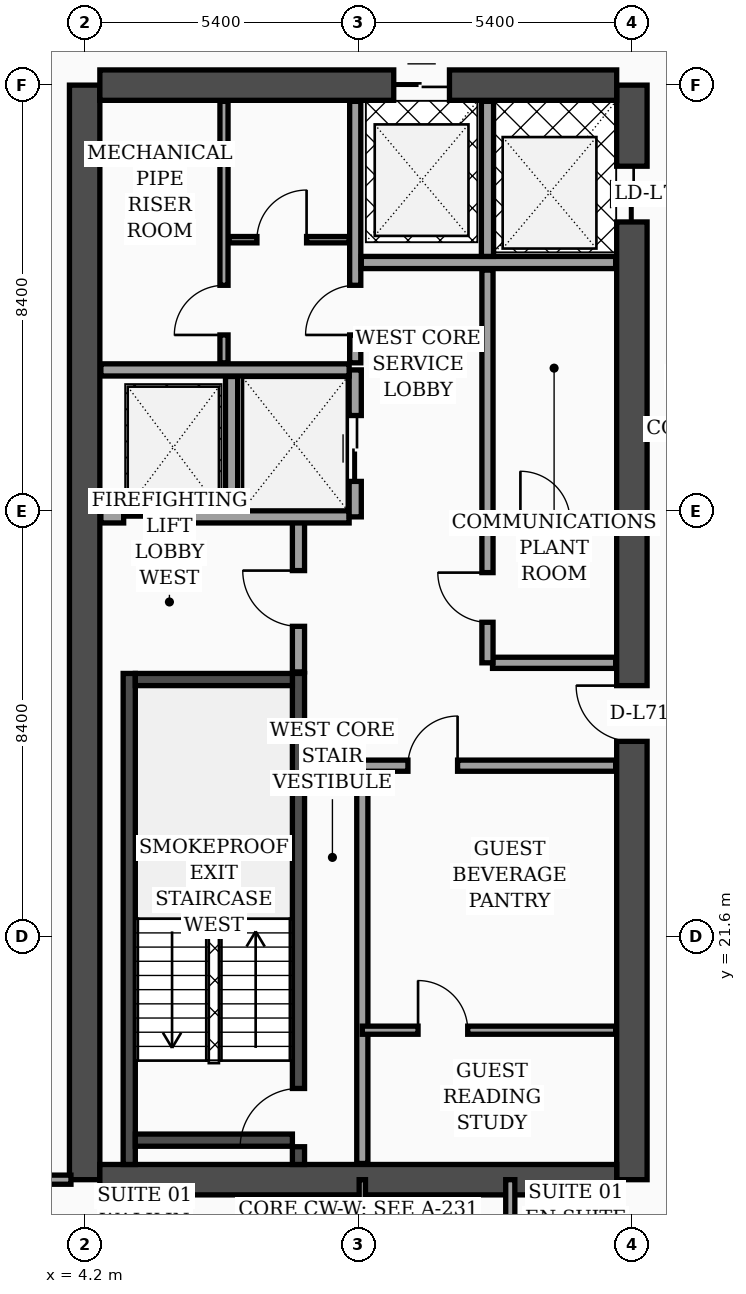
"""IFC4 building model, lengths in metres.
Left out: names, types, materials, properties, quantities, classifications, styles, units other than length and angle.
Written with IfcOpenShell. Run it as: python <this file> out.ifc"""

import sys

from ifc_helpers import new_model, si_unit, direction, frame, frame_2d, origin, place, context, subcontext, project, spatial, rectangle, extrude, element, fill, save


model = new_model("IFC4")
c1 = context("Model", 3, precision=1e-05, world=origin(), true_north=direction((0.0, 1.0)))
c2 = subcontext(c1, "Body", "Model", "MODEL_VIEW")
j1 = project(units=[si_unit("LENGTHUNIT", "METRE"), si_unit("PLANEANGLEUNIT", "RADIAN")], contexts=[c1])
p1 = place(None, origin())
s1 = spatial("IfcSite", under=j1, at=p1, CompositionType="ELEMENT")
p2 = place(p1, origin())
s2 = spatial("IfcBuilding", under=s1, at=p2, CompositionType="ELEMENT")
p3 = place(p2, frame((0.0, 0.0, 287.3)))
s3 = spatial("IfcBuildingStorey", under=s2, at=p3, CompositionType="ELEMENT", Elevation=287.3)
p4 = place(p3, frame((4.2, 16.8, 0.0), z_axis=(0.0, 0.0, 1.0), x_axis=(0.0, 1.0, 0.0)))
e1 = element("IfcWall", 1, at=p4, inside=s3, PredefinedType="SHEAR", context=c2, shape_type="SweptSolid", body=[
    extrude(rectangle(XDim=21.6, YDim=0.6, at=frame_2d((10.8, 0.0))), origin(), (0.0, 0.0, 1.0), 3.56),
])
p5 = place(p3, frame((15.0, 16.8, 0.0), z_axis=(0.0, 0.0, 1.0), x_axis=(0.0, 1.0, 0.0)))
e2 = element("IfcWall", 2, at=p5, inside=s3, PredefinedType="SHEAR", context=c2, shape_type="SweptSolid", body=[
    extrude(rectangle(XDim=21.6, YDim=0.6, at=frame_2d((10.8, 0.0))), origin(), (0.0, 0.0, 1.0), 3.56),
])
p6 = place(p5, frame((8.65, 0.0, 0.0)))
e3 = element("IfcOpeningElement", 3, at=p6, cuts=e2, PredefinedType="OPENING", context=c2, shape_type="SweptSolid", body=[
    extrude(rectangle(XDim=1.1, YDim=2.2, at=frame_2d((0.55, 1.1))), frame((0.0, 0.31, 0.0), z_axis=(0.0, -1.0, 0.0), x_axis=(1.0, 0.0, 0.0)), (0.0, 0.0, 1.0), 0.62),
])
p7 = place(p5, frame((18.9, 0.0, 0.0)))
e4 = element("IfcOpeningElement", 4, at=p7, cuts=e2, PredefinedType="OPENING", context=c2, shape_type="SweptSolid", body=[
    extrude(rectangle(XDim=1.1, YDim=2.2, at=frame_2d((0.55, 1.1))), frame((0.0, 0.31, 0.0), z_axis=(0.0, -1.0, 0.0), x_axis=(1.0, 0.0, 0.0)), (0.0, 0.0, 1.0), 0.62),
])
p8 = place(p3, frame((4.5, 38.4, 0.0), z_axis=(0.0, 0.0, 1.0), x_axis=(1.0, 0.0, 0.0)))
e5 = element("IfcWall", 5, at=p8, inside=s3, PredefinedType="SHEAR", context=c2, shape_type="SweptSolid", body=[
    extrude(rectangle(XDim=10.2, YDim=0.6, at=frame_2d((5.1, 0.0))), origin(), (0.0, 0.0, 1.0), 3.56),
])
p9 = place(p8, frame((5.8, 0.0, 0.0)))
e6 = element("IfcOpeningElement", 6, at=p9, cuts=e5, PredefinedType="OPENING", context=c2, shape_type="SweptSolid", body=[
    extrude(rectangle(XDim=1.1, YDim=2.2, at=frame_2d((0.55, 1.1))), frame((0.0, 0.31, 0.0), z_axis=(0.0, -1.0, 0.0), x_axis=(1.0, 0.0, 0.0)), (0.0, 0.0, 1.0), 0.62),
])
p10 = place(p3, frame((4.5, 16.8, 0.0), z_axis=(0.0, 0.0, 1.0), x_axis=(1.0, 0.0, 0.0)))
e7 = element("IfcWall", 7, at=p10, inside=s3, PredefinedType="SHEAR", context=c2, shape_type="SweptSolid", body=[
    extrude(rectangle(XDim=10.2, YDim=0.6, at=frame_2d((5.1, 0.0))), origin(), (0.0, 0.0, 1.0), 3.56),
])
p11 = place(p3, frame((5.08, 17.1, 0.0), z_axis=(0.0, 0.0, 1.0), x_axis=(0.0, 1.0, 0.0)))
e8 = element("IfcWall", 8, at=p11, inside=s3, PredefinedType="SOLIDWALL", context=c2, shape_type="SweptSolid", body=[
    extrude(rectangle(XDim=9.69, YDim=0.24, at=frame_2d((4.845, 0.0))), origin(), (0.0, 0.0, 1.0), 3.56),
])
p12 = place(p3, frame((8.42, 17.1, 0.0), z_axis=(0.0, 0.0, 1.0), x_axis=(0.0, 1.0, 0.0)))
e9 = element("IfcWall", 9, at=p12, inside=s3, PredefinedType="SOLIDWALL", context=c2, shape_type="SweptSolid", body=[
    extrude(rectangle(XDim=9.69, YDim=0.24, at=frame_2d((4.845, 0.0))), origin(), (0.0, 0.0, 1.0), 3.56),
])
p13 = place(p12, frame((0.35, 0.0, 0.0)))
e10 = element("IfcOpeningElement", 10, at=p13, cuts=e9, PredefinedType="OPENING", context=c2, shape_type="SweptSolid", body=[
    extrude(rectangle(XDim=1.15, YDim=2.2, at=frame_2d((0.575, 1.1))), frame((0.0, 0.13, 0.0), z_axis=(0.0, -1.0, 0.0), x_axis=(1.0, 0.0, 0.0)), (0.0, 0.0, 1.0), 0.26),
])
for number, where, z_axis, x_axis in (
    (11, (5.2, 17.58, 0.0), (0.0, 0.0, 1.0), (1.0, 0.0, 0.0)),
    (12, (5.2, 26.67, 0.0), (0.0, 0.0, 1.0), (1.0, 0.0, 0.0)),
):
    element("IfcWall", number, at=place(p3, frame(where, z_axis=z_axis, x_axis=x_axis)), inside=s3, PredefinedType="SOLIDWALL", context=c2, shape_type="SweptSolid", body=[
        extrude(rectangle(XDim=3.1, YDim=0.24, at=frame_2d((1.55, 0.0))), origin(), (0.0, 0.0, 1.0), 3.56),
    ])
p14 = place(p3, frame((8.42, 26.82, 0.0), z_axis=(0.0, 0.0, 1.0), x_axis=(0.0, 1.0, 0.0)))
e13 = element("IfcWall", 13, at=p14, inside=s3, PredefinedType="SOLIDWALL", context=c2, shape_type="SweptSolid", body=[
    extrude(rectangle(XDim=3.0, YDim=0.24, at=frame_2d((1.5, 0.0))), origin(), (0.0, 0.0, 1.0), 3.56),
])
p15 = place(p14, frame((0.9, 0.0, 0.0)))
e14 = element("IfcOpeningElement", 14, at=p15, cuts=e13, PredefinedType="OPENING", context=c2, shape_type="SweptSolid", body=[
    extrude(rectangle(XDim=1.1, YDim=2.2, at=frame_2d((0.55, 1.1))), frame((0.0, 0.13, 0.0), z_axis=(0.0, -1.0, 0.0), x_axis=(1.0, 0.0, 0.0)), (0.0, 0.0, 1.0), 0.26),
])
p16 = place(p3, frame((4.52, 29.88, 0.0), z_axis=(0.0, 0.0, 1.0), x_axis=(1.0, 0.0, 0.0)))
e15 = element("IfcWall", 15, at=p16, inside=s3, PredefinedType="SOLIDWALL", context=c2, shape_type="SweptSolid", body=[
    extrude(rectangle(XDim=4.9, YDim=0.24, at=frame_2d((2.45, 0.0))), origin(), (0.0, 0.0, 1.0), 3.56),
])
p17 = place(p16, frame((0.45, 0.0, 0.0)))
e16 = element("IfcOpeningElement", 16, at=p17, cuts=e15, PredefinedType="OPENING", context=c2, shape_type="SweptSolid", body=[
    extrude(rectangle(XDim=1.3, YDim=2.35, at=frame_2d((0.65, 1.175))), frame((0.0, 0.13, 0.0), z_axis=(0.0, -1.0, 0.0), x_axis=(1.0, 0.0, 0.0)), (0.0, 0.0, 1.0), 0.26),
])
p18 = place(p3, frame((7.1, 30.02, 0.0), z_axis=(0.0, 0.0, 1.0), x_axis=(0.0, 1.0, 0.0)))
e17 = element("IfcWall", 17, at=p18, inside=s3, PredefinedType="SOLIDWALL", context=c2, shape_type="SweptSolid", body=[
    extrude(rectangle(XDim=2.63, YDim=0.24, at=frame_2d((1.315, 0.0))), origin(), (0.0, 0.0, 1.0), 3.56),
])
p19 = place(p3, frame((9.54, 29.88, 0.0), z_axis=(0.0, 0.0, 1.0), x_axis=(0.0, 1.0, 0.0)))
e18 = element("IfcWall", 18, at=p19, inside=s3, PredefinedType="SOLIDWALL", context=c2, shape_type="SweptSolid", body=[
    extrude(rectangle(XDim=2.9, YDim=0.24, at=frame_2d((1.45, 0.0))), origin(), (0.0, 0.0, 1.0), 3.56),
])
p20 = place(p19, frame((0.7, 0.0, 0.0)))
e19 = element("IfcOpeningElement", 19, at=p20, cuts=e18, PredefinedType="OPENING", context=c2, shape_type="SweptSolid", body=[
    extrude(rectangle(XDim=1.3, YDim=2.35, at=frame_2d((0.65, 1.175))), frame((0.0, 0.13, 0.0), z_axis=(0.0, -1.0, 0.0), x_axis=(1.0, 0.0, 0.0)), (0.0, 0.0, 1.0), 0.26),
])
p21 = place(p3, frame((4.52, 32.78, 0.0), z_axis=(0.0, 0.0, 1.0), x_axis=(1.0, 0.0, 0.0)))
e20 = element("IfcWall", 20, at=p21, inside=s3, PredefinedType="SOLIDWALL", context=c2, shape_type="SweptSolid", body=[
    extrude(rectangle(XDim=4.9, YDim=0.24, at=frame_2d((2.45, 0.0))), origin(), (0.0, 0.0, 1.0), 3.19),
])
p22 = place(p3, frame((9.68, 17.12, 0.0), z_axis=(0.0, 0.0, 1.0), x_axis=(0.0, 1.0, 0.0)))
e21 = element("IfcWall", 21, at=p22, inside=s3, PredefinedType="SOLIDWALL", context=c2, shape_type="SweptSolid", body=[
    extrude(rectangle(XDim=7.88, YDim=0.22, at=frame_2d((3.94, 0.0))), origin(), (0.0, 0.0, 1.0), 3.56),
])
p23 = place(p3, frame((6.95, 32.92, 0.0), z_axis=(0.0, 0.0, 1.0), x_axis=(0.0, 1.0, 0.0)))
e22 = element("IfcWall", 22, at=p23, inside=s3, PredefinedType="PARTITIONING", context=c2, shape_type="SweptSolid", body=[
    extrude(rectangle(XDim=5.16, YDim=0.16, at=frame_2d((2.58, 0.0))), origin(), (0.0, 0.0, 1.0), 3.56),
])
p24 = place(p23, frame((0.55, 0.0, 0.0)))
e23 = element("IfcOpeningElement", 23, at=p24, cuts=e22, PredefinedType="OPENING", context=c2, shape_type="SweptSolid", body=[
    extrude(rectangle(XDim=0.98, YDim=2.15, at=frame_2d((0.49, 1.075))), frame((0.0, 0.09, 0.0), z_axis=(0.0, -1.0, 0.0), x_axis=(1.0, 0.0, 0.0)), (0.0, 0.0, 1.0), 0.18),
])
p25 = place(p3, frame((7.05, 35.35, 0.0), z_axis=(0.0, 0.0, 1.0), x_axis=(1.0, 0.0, 0.0)))
e24 = element("IfcWall", 24, at=p25, inside=s3, PredefinedType="PARTITIONING", context=c2, shape_type="SweptSolid", body=[
    extrude(rectangle(XDim=2.37, YDim=0.125, at=frame_2d((1.185, 0.0))), origin(), (0.0, 0.0, 1.0), 3.56),
])
p26 = place(p25, frame((0.55, 0.0, 0.0)))
e25 = element("IfcOpeningElement", 25, at=p26, cuts=e24, PredefinedType="OPENING", context=c2, shape_type="SweptSolid", body=[
    extrude(rectangle(XDim=0.98, YDim=2.15, at=frame_2d((0.49, 1.075))), frame((0.0, 0.073, 0.0), z_axis=(0.0, -1.0, 0.0), x_axis=(1.0, 0.0, 0.0)), (0.0, 0.0, 1.0), 0.145),
])
p27 = place(p3, frame((9.54, 32.92, 0.0), z_axis=(0.0, 0.0, 1.0), x_axis=(0.0, 1.0, 0.0)))
e26 = element("IfcWall", 26, at=p27, inside=s3, PredefinedType="SOLIDWALL", context=c2, shape_type="SweptSolid", body=[
    extrude(rectangle(XDim=5.16, YDim=0.22, at=frame_2d((2.58, 0.0))), origin(), (0.0, 0.0, 1.0), 3.56),
])
p28 = place(p27, frame((0.55, 0.0, 0.0)))
e27 = element("IfcOpeningElement", 27, at=p28, cuts=e26, PredefinedType="OPENING", context=c2, shape_type="SweptSolid", body=[
    extrude(rectangle(XDim=0.98, YDim=2.15, at=frame_2d((0.49, 1.075))), frame((0.0, 0.12, 0.0), z_axis=(0.0, -1.0, 0.0), x_axis=(1.0, 0.0, 0.0)), (0.0, 0.0, 1.0), 0.24),
])
p29 = place(p3, frame((9.68, 19.75, 0.0), z_axis=(0.0, 0.0, 1.0), x_axis=(1.0, 0.0, 0.0)))
e28 = element("IfcWall", 28, at=p29, inside=s3, PredefinedType="PARTITIONING", context=c2, shape_type="SweptSolid", body=[
    extrude(rectangle(XDim=5.0, YDim=0.16, at=frame_2d((2.5, 0.0))), origin(), (0.0, 0.0, 1.0), 3.56),
])
p30 = place(p29, frame((1.1, 0.0, 0.0)))
e29 = element("IfcOpeningElement", 29, at=p30, cuts=e28, PredefinedType="OPENING", context=c2, shape_type="SweptSolid", body=[
    extrude(rectangle(XDim=0.98, YDim=2.15, at=frame_2d((0.49, 1.075))), frame((0.0, 0.09, 0.0), z_axis=(0.0, -1.0, 0.0), x_axis=(1.0, 0.0, 0.0)), (0.0, 0.0, 1.0), 0.18),
])
p31 = place(p3, frame((9.68, 24.97, 0.0), z_axis=(0.0, 0.0, 1.0), x_axis=(1.0, 0.0, 0.0)))
e30 = element("IfcWall", 30, at=p31, inside=s3, PredefinedType="SOLIDWALL", context=c2, shape_type="SweptSolid", body=[
    extrude(rectangle(XDim=5.0, YDim=0.22, at=frame_2d((2.5, 0.0))), origin(), (0.0, 0.0, 1.0), 2.99),
])
p32 = place(p31, frame((0.9, 0.0, 0.0)))
e31 = element("IfcOpeningElement", 31, at=p32, cuts=e30, PredefinedType="OPENING", context=c2, shape_type="SweptSolid", body=[
    extrude(rectangle(XDim=0.98, YDim=2.15, at=frame_2d((0.49, 1.075))), frame((0.0, 0.12, 0.0), z_axis=(0.0, -1.0, 0.0), x_axis=(1.0, 0.0, 0.0)), (0.0, 0.0, 1.0), 0.24),
])
p33 = place(p3, frame((12.25, 27.0, 0.0), z_axis=(0.0, 0.0, 1.0), x_axis=(1.0, 0.0, 0.0)))
e32 = element("IfcWall", 32, at=p33, inside=s3, PredefinedType="SOLIDWALL", context=c2, shape_type="SweptSolid", body=[
    extrude(rectangle(XDim=2.43, YDim=0.22, at=frame_2d((1.215, 0.0))), origin(), (0.0, 0.0, 1.0), 3.56),
])
p34 = place(p3, frame((12.15, 27.0, 0.0), z_axis=(0.0, 0.0, 1.0), x_axis=(0.0, 1.0, 0.0)))
e33 = element("IfcWall", 33, at=p34, inside=s3, PredefinedType="SOLIDWALL", context=c2, shape_type="SweptSolid", body=[
    extrude(rectangle(XDim=7.75, YDim=0.22, at=frame_2d((3.875, 0.0))), origin(), (0.0, 0.0, 1.0), 3.56),
])
p35 = place(p34, frame((0.8, 0.0, 0.0)))
e34 = element("IfcOpeningElement", 34, at=p35, cuts=e33, PredefinedType="OPENING", context=c2, shape_type="SweptSolid", body=[
    extrude(rectangle(XDim=0.98, YDim=2.15, at=frame_2d((0.49, 1.075))), frame((0.0, 0.12, 0.0), z_axis=(0.0, -1.0, 0.0), x_axis=(1.0, 0.0, 0.0)), (0.0, 0.0, 1.0), 0.24),
])
p36 = place(p3, frame((12.25, 29.8, 0.0), z_axis=(0.0, 0.0, 1.0), x_axis=(1.0, 0.0, 0.0)))
e35 = element("IfcWall", 35, at=p36, inside=s3, PredefinedType="PARTITIONING", context=c2, shape_type="SweptSolid", body=[
    extrude(rectangle(XDim=2.43, YDim=0.16, at=frame_2d((1.215, 0.0))), origin(), (0.0, 0.0, 1.0), 3.56),
])
p37 = place(p36, frame((0.55, 0.0, 0.0)))
e36 = element("IfcOpeningElement", 36, at=p37, cuts=e35, PredefinedType="OPENING", context=c2, shape_type="SweptSolid", body=[
    extrude(rectangle(XDim=0.98, YDim=2.15, at=frame_2d((0.49, 1.075))), frame((0.0, 0.09, 0.0), z_axis=(0.0, -1.0, 0.0), x_axis=(1.0, 0.0, 0.0)), (0.0, 0.0, 1.0), 0.18),
])
p38 = place(p3, frame((9.66, 34.9, 0.0), z_axis=(0.0, 0.0, 1.0), x_axis=(1.0, 0.0, 0.0)))
e37 = element("IfcWall", 37, at=p38, inside=s3, PredefinedType="SOLIDWALL", context=c2, shape_type="SweptSolid", body=[
    extrude(rectangle(XDim=5.02, YDim=0.24, at=frame_2d((2.51, 0.0))), origin(), (0.0, 0.0, 1.0), 3.56),
])
p39 = place(p3, frame((12.15, 35.02, 0.0), z_axis=(0.0, 0.0, 1.0), x_axis=(0.0, 1.0, 0.0)))
e38 = element("IfcWall", 38, at=p39, inside=s3, PredefinedType="SOLIDWALL", context=c2, shape_type="SweptSolid", body=[
    extrude(rectangle(XDim=3.06, YDim=0.24, at=frame_2d((1.53, 0.0))), origin(), (0.0, 0.0, 1.0), 3.56),
])
p40 = place(p3, frame((0.08, 16.8, 0.0), z_axis=(0.0, 0.0, 1.0), x_axis=(1.0, 0.0, 0.0)))
e39 = element("IfcWall", 39, at=p40, inside=s3, PredefinedType="PARTITIONING", context=c2, shape_type="SweptSolid", body=[
    extrude(rectangle(XDim=3.85, YDim=0.18, at=frame_2d((1.925, 0.0))), origin(), (0.0, 0.0, 1.0), 2.99),
])
p41 = place(p3, frame((9.68, 14.55, 0.0), z_axis=(0.0, 0.0, 1.0), x_axis=(0.0, 1.0, 0.0)))
e40 = element("IfcWall", 40, at=p41, inside=s3, PredefinedType="PARTITIONING", context=c2, shape_type="SweptSolid", body=[
    extrude(rectangle(XDim=2.25, YDim=0.125, at=frame_2d((1.125, 0.0))), origin(), (0.0, 0.0, 1.0), 3.56),
])
p42 = place(p3, frame((12.6, 2.44, 0.0), z_axis=(0.0, 0.0, 1.0), x_axis=(0.0, 1.0, 0.0)))
e41 = element("IfcWall", 41, at=p42, inside=s3, PredefinedType="PARTITIONING", context=c2, shape_type="SweptSolid", body=[
    extrude(rectangle(XDim=14.36, YDim=0.18, at=frame_2d((7.18, 0.0))), origin(), (0.0, 0.0, 1.0), 2.99),
])
p43 = place(p42, frame((3.01, 0.0, 0.0)))
e42 = element("IfcOpeningElement", 42, at=p43, cuts=e41, PredefinedType="OPENING", context=c2, shape_type="SweptSolid", body=[
    extrude(rectangle(XDim=1.02, YDim=2.2, at=frame_2d((0.51, 1.1))), frame((0.0, 0.1, 0.0), z_axis=(0.0, -1.0, 0.0), x_axis=(1.0, 0.0, 0.0)), (0.0, 0.0, 1.0), 0.2),
])
p44 = place(p15, origin())
e43 = element("IfcDoor", 43, at=p44, inside=s3, OperationType="SINGLE_SWING_RIGHT", PredefinedType="DOOR", context=c2, shape_type="SweptSolid", body=[
    extrude(rectangle(XDim=1.1, YDim=2.2, at=frame_2d((0.55, 1.1))), frame((0.0, 0.025, 0.0), z_axis=(0.0, -1.0, 0.0), x_axis=(1.0, 0.0, 0.0)), (0.0, 0.0, 1.0), 0.05),
])
fill(e14, e43)
p45 = place(p17, origin())
e44 = element("IfcDoor", 44, at=p45, inside=s3, OperationType="DOUBLE_DOOR_SLIDING", PredefinedType="DOOR", context=c2, shape_type="SweptSolid", body=[
    extrude(rectangle(XDim=1.3, YDim=2.35, at=frame_2d((0.65, 1.175))), frame((0.0, 0.025, 0.0), z_axis=(0.0, -1.0, 0.0), x_axis=(1.0, 0.0, 0.0)), (0.0, 0.0, 1.0), 0.05),
])
fill(e16, e44)
p46 = place(p20, origin())
e45 = element("IfcDoor", 45, at=p46, inside=s3, OperationType="DOUBLE_DOOR_SLIDING", PredefinedType="DOOR", context=c2, shape_type="SweptSolid", body=[
    extrude(rectangle(XDim=1.3, YDim=2.35, at=frame_2d((0.65, 1.175))), frame((0.0, 0.025, 0.0), z_axis=(0.0, -1.0, 0.0), x_axis=(1.0, 0.0, 0.0)), (0.0, 0.0, 1.0), 0.05),
])
fill(e19, e45)
p47 = place(p24, origin())
e46 = element("IfcDoor", 46, at=p47, inside=s3, OperationType="SINGLE_SWING_LEFT", PredefinedType="DOOR", context=c2, shape_type="SweptSolid", body=[
    extrude(rectangle(XDim=0.98, YDim=2.15, at=frame_2d((0.49, 1.075))), frame((0.0, 0.025, 0.0), z_axis=(0.0, -1.0, 0.0), x_axis=(1.0, 0.0, 0.0)), (0.0, 0.0, 1.0), 0.05),
])
fill(e23, e46)
p48 = place(p26, origin())
e47 = element("IfcDoor", 47, at=p48, inside=s3, OperationType="SINGLE_SWING_RIGHT", PredefinedType="DOOR", context=c2, shape_type="SweptSolid", body=[
    extrude(rectangle(XDim=0.98, YDim=2.15, at=frame_2d((0.49, 1.075))), frame((0.0, 0.025, 0.0), z_axis=(0.0, -1.0, 0.0), x_axis=(1.0, 0.0, 0.0)), (0.0, 0.0, 1.0), 0.05),
])
fill(e25, e47)
p49 = place(p28, origin())
e48 = element("IfcDoor", 48, at=p49, inside=s3, OperationType="SINGLE_SWING_LEFT", PredefinedType="DOOR", context=c2, shape_type="SweptSolid", body=[
    extrude(rectangle(XDim=0.98, YDim=2.15, at=frame_2d((0.49, 1.075))), frame((0.0, 0.025, 0.0), z_axis=(0.0, -1.0, 0.0), x_axis=(1.0, 0.0, 0.0)), (0.0, 0.0, 1.0), 0.05),
])
fill(e27, e48)
p50 = place(p30, origin())
e49 = element("IfcDoor", 49, at=p50, inside=s3, OperationType="SINGLE_SWING_LEFT", PredefinedType="DOOR", context=c2, shape_type="SweptSolid", body=[
    extrude(rectangle(XDim=0.98, YDim=2.15, at=frame_2d((0.49, 1.075))), frame((0.0, 0.025, 0.0), z_axis=(0.0, -1.0, 0.0), x_axis=(1.0, 0.0, 0.0)), (0.0, 0.0, 1.0), 0.05),
])
fill(e29, e49)
p51 = place(p32, origin())
e50 = element("IfcDoor", 50, at=p51, inside=s3, OperationType="SINGLE_SWING_RIGHT", PredefinedType="DOOR", context=c2, shape_type="SweptSolid", body=[
    extrude(rectangle(XDim=0.98, YDim=2.15, at=frame_2d((0.49, 1.075))), frame((0.0, 0.025, 0.0), z_axis=(0.0, -1.0, 0.0), x_axis=(1.0, 0.0, 0.0)), (0.0, 0.0, 1.0), 0.05),
])
fill(e31, e50)
p52 = place(p35, origin())
e51 = element("IfcDoor", 51, at=p52, inside=s3, OperationType="SINGLE_SWING_RIGHT", PredefinedType="DOOR", context=c2, shape_type="SweptSolid", body=[
    extrude(rectangle(XDim=0.98, YDim=2.15, at=frame_2d((0.49, 1.075))), frame((0.0, 0.025, 0.0), z_axis=(0.0, -1.0, 0.0), x_axis=(1.0, 0.0, 0.0)), (0.0, 0.0, 1.0), 0.05),
])
fill(e34, e51)
p53 = place(p37, origin())
e52 = element("IfcDoor", 52, at=p53, inside=s3, OperationType="SINGLE_SWING_LEFT", PredefinedType="DOOR", context=c2, shape_type="SweptSolid", body=[
    extrude(rectangle(XDim=0.98, YDim=2.15, at=frame_2d((0.49, 1.075))), frame((0.0, 0.025, 0.0), z_axis=(0.0, -1.0, 0.0), x_axis=(1.0, 0.0, 0.0)), (0.0, 0.0, 1.0), 0.05),
])
fill(e36, e52)
p54 = place(p13, origin())
e53 = element("IfcDoor", 53, at=p54, inside=s3, OperationType="SINGLE_SWING_LEFT", PredefinedType="DOOR", context=c2, shape_type="SweptSolid", body=[
    extrude(rectangle(XDim=1.15, YDim=2.2, at=frame_2d((0.575, 1.1))), frame((0.0, 0.025, 0.0), z_axis=(0.0, -1.0, 0.0), x_axis=(1.0, 0.0, 0.0)), (0.0, 0.0, 1.0), 0.05),
])
fill(e10, e53)
p55 = place(p6, origin())
e54 = element("IfcDoor", 54, at=p55, inside=s3, OperationType="SINGLE_SWING_RIGHT", PredefinedType="DOOR", context=c2, shape_type="SweptSolid", body=[
    extrude(rectangle(XDim=1.1, YDim=2.2, at=frame_2d((0.55, 1.1))), frame((0.0, 0.025, 0.0), z_axis=(0.0, -1.0, 0.0), x_axis=(1.0, 0.0, 0.0)), (0.0, 0.0, 1.0), 0.05),
])
fill(e3, e54)
p56 = place(p7, origin())
e55 = element("IfcDoor", 55, at=p56, inside=s3, OperationType="DOUBLE_DOOR_SLIDING", PredefinedType="DOOR", context=c2, shape_type="SweptSolid", body=[
    extrude(rectangle(XDim=1.1, YDim=2.2, at=frame_2d((0.55, 1.1))), frame((0.0, 0.025, 0.0), z_axis=(0.0, -1.0, 0.0), x_axis=(1.0, 0.0, 0.0)), (0.0, 0.0, 1.0), 0.05),
])
fill(e4, e55)
p57 = place(p9, origin())
e56 = element("IfcDoor", 56, at=p57, inside=s3, OperationType="DOUBLE_DOOR_SLIDING", PredefinedType="DOOR", context=c2, shape_type="SweptSolid", body=[
    extrude(rectangle(XDim=1.1, YDim=2.2, at=frame_2d((0.55, 1.1))), frame((0.0, 0.025, 0.0), z_axis=(0.0, -1.0, 0.0), x_axis=(1.0, 0.0, 0.0)), (0.0, 0.0, 1.0), 0.05),
])
fill(e6, e56)
save(model, sys.argv[1])
